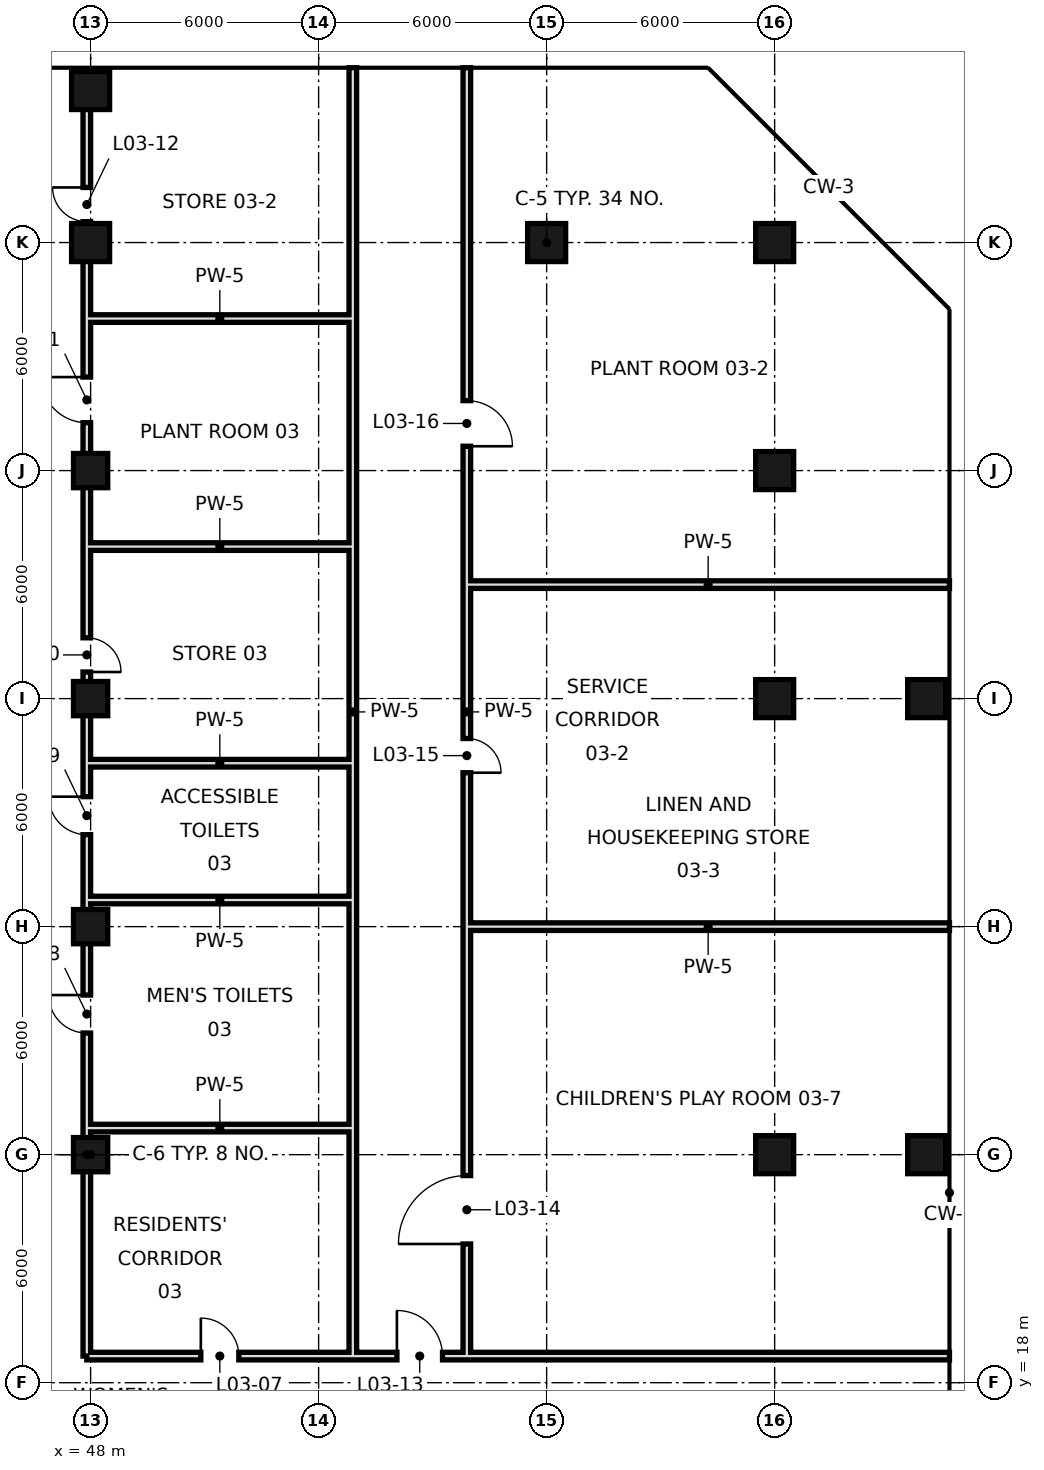
"""IFC4 building model, lengths in metres.
Left out: names, types, materials, properties, quantities, classifications, styles, units other than length and angle.
Written with IfcOpenShell. Run it as: python <this file> out.ifc"""

import sys

from ifc_helpers import new_model, si_unit, direction, frame, frame_2d, origin, origin_2d, place, context, subcontext, project, spatial, rectangle, hollow_rectangle, extrude, element, fill, save


model = new_model("IFC4")
c1 = context("Model", 3, precision=1e-05, world=origin(), true_north=direction((0.0, 1.0)))
c2 = subcontext(c1, "Body", "Model", "MODEL_VIEW")
j1 = project(units=[si_unit("LENGTHUNIT", "METRE"), si_unit("PLANEANGLEUNIT", "RADIAN")], contexts=[c1])
p1 = place(None, origin())
s1 = spatial("IfcSite", under=j1, at=p1, CompositionType="ELEMENT")
p2 = place(p1, origin())
s2 = spatial("IfcBuilding", under=s1, at=p2, CompositionType="ELEMENT")
p3 = place(p2, frame((0.0, 0.0, 25.2)))
s3 = spatial("IfcBuildingStorey", under=s2, at=p3, CompositionType="ELEMENT", Elevation=25.2)
for number, where, z_axis, x_axis in (
    (1, (48.0, 24.0, 0.0), (0.0, 0.0, 1.0), (1.0, 0.0, 0.0)),
    (2, (48.0, 30.0, 0.0), (0.0, 0.0, 1.0), (1.0, 0.0, 0.0)),
    (3, (48.0, 36.0, 0.0), (0.0, 0.0, 1.0), (1.0, 0.0, 0.0)),
    (4, (48.0, 42.0, 0.0), (0.0, 0.0, 1.0), (1.0, 0.0, 0.0)),
):
    element("IfcColumn", number, at=place(p3, frame(where, z_axis=z_axis, x_axis=x_axis)), inside=s3, PredefinedType="COLUMN", context=c2, shape_type="SweptSolid", body=[
        extrude(hollow_rectangle(XDim=0.9, YDim=0.9, WallThickness=0.045, at=origin_2d()), origin(), (0.0, 0.0, 1.0), 4.8),
    ])
for number, where, z_axis, x_axis in (
    (5, (48.0, 48.0, 0.0), (0.0, 0.0, 1.0), (1.0, 0.0, 0.0)),
    (6, (48.0, 52.0, 0.0), (0.0, 0.0, 1.0), (1.0, 0.0, 0.0)),
    (7, (60.0, 48.0, 0.0), (0.0, 0.0, 1.0), (1.0, 0.0, 0.0)),
    (8, (66.0, 24.0, 0.0), (0.0, 0.0, 1.0), (1.0, 0.0, 0.0)),
    (9, (66.0, 36.0, 0.0), (0.0, 0.0, 1.0), (1.0, 0.0, 0.0)),
    (10, (66.0, 42.0, 0.0), (0.0, 0.0, 1.0), (1.0, 0.0, 0.0)),
    (11, (66.0, 48.0, 0.0), (0.0, 0.0, 1.0), (1.0, 0.0, 0.0)),
    (12, (70.0, 24.0, 0.0), (0.0, 0.0, 1.0), (1.0, 0.0, 0.0)),
    (13, (70.0, 36.0, 0.0), (0.0, 0.0, 1.0), (1.0, 0.0, 0.0)),
):
    element("IfcColumn", number, at=place(p3, frame(where, z_axis=z_axis, x_axis=x_axis)), inside=s3, PredefinedType="COLUMN", context=c2, shape_type="SweptSolid", body=[
        extrude(hollow_rectangle(XDim=1.0, YDim=1.0, WallThickness=0.05, at=origin_2d()), origin(), (0.0, 0.0, 1.0), 4.8),
    ])
p4 = place(p3, frame((47.9, 18.7, 0.0), z_axis=(0.0, 0.0, 1.0), x_axis=(0.0, 1.0, 0.0)))
e14 = element("IfcWall", 14, at=p4, inside=s3, PredefinedType="SOLIDWALL", context=c2, shape_type="SweptSolid", body=[
    extrude(rectangle(XDim=33.3, YDim=0.2, at=frame_2d((16.65, 0.0))), origin(), (0.0, 0.0, 1.0), 3.7),
])
p5 = place(p4, frame((8.5, 0.0, 0.0)))
e15 = element("IfcOpeningElement", 15, at=p5, cuts=e14, PredefinedType="OPENING", context=c2, shape_type="SweptSolid", body=[
    extrude(rectangle(XDim=1.0, YDim=2.4, at=frame_2d((0.5, 1.2))), frame((0.0, 0.11, 0.0), z_axis=(0.0, -1.0, 0.0), x_axis=(1.0, 0.0, 0.0)), (0.0, 0.0, 1.0), 0.22),
])
p6 = place(p4, frame((13.72, 0.0, 0.0)))
e16 = element("IfcOpeningElement", 16, at=p6, cuts=e14, PredefinedType="OPENING", context=c2, shape_type="SweptSolid", body=[
    extrude(rectangle(XDim=1.0, YDim=2.4, at=frame_2d((0.5, 1.2))), frame((0.0, 0.11, 0.0), z_axis=(0.0, -1.0, 0.0), x_axis=(1.0, 0.0, 0.0)), (0.0, 0.0, 1.0), 0.22),
])
p7 = place(p4, frame((18.0, 0.0, 0.0)))
e17 = element("IfcOpeningElement", 17, at=p7, cuts=e14, PredefinedType="OPENING", context=c2, shape_type="SweptSolid", body=[
    extrude(rectangle(XDim=0.9, YDim=2.1, at=frame_2d((0.45, 1.05))), frame((0.0, 0.11, 0.0), z_axis=(0.0, -1.0, 0.0), x_axis=(1.0, 0.0, 0.0)), (0.0, 0.0, 1.0), 0.22),
])
p8 = place(p4, frame((24.56, 0.0, 0.0)))
e18 = element("IfcOpeningElement", 18, at=p8, cuts=e14, PredefinedType="OPENING", context=c2, shape_type="SweptSolid", body=[
    extrude(rectangle(XDim=1.2, YDim=2.4, at=frame_2d((0.6, 1.2))), frame((0.0, 0.11, 0.0), z_axis=(0.0, -1.0, 0.0), x_axis=(1.0, 0.0, 0.0)), (0.0, 0.0, 1.0), 0.22),
])
p9 = place(p4, frame((29.85, 0.0, 0.0)))
e19 = element("IfcOpeningElement", 19, at=p9, cuts=e14, PredefinedType="OPENING", context=c2, shape_type="SweptSolid", body=[
    extrude(rectangle(XDim=0.9, YDim=2.1, at=frame_2d((0.45, 1.05))), frame((0.0, 0.11, 0.0), z_axis=(0.0, -1.0, 0.0), x_axis=(1.0, 0.0, 0.0)), (0.0, 0.0, 1.0), 0.22),
])
p10 = place(p3, frame((54.9, 18.7, 0.0), z_axis=(0.0, 0.0, 1.0), x_axis=(0.0, 1.0, 0.0)))
e20 = element("IfcWall", 20, at=p10, inside=s3, PredefinedType="SOLIDWALL", context=c2, shape_type="SweptSolid", body=[
    extrude(rectangle(XDim=33.9, YDim=0.2, at=frame_2d((16.95, 0.0))), origin(), (0.0, 0.0, 1.0), 3.5),
])
p11 = place(p3, frame((57.9, 18.7, 0.0), z_axis=(0.0, 0.0, 1.0), x_axis=(0.0, 1.0, 0.0)))
e21 = element("IfcWall", 21, at=p11, inside=s3, PredefinedType="SOLIDWALL", context=c2, shape_type="SweptSolid", body=[
    extrude(rectangle(XDim=33.9, YDim=0.2, at=frame_2d((16.95, 0.0))), origin(), (0.0, 0.0, 1.0), 3.5),
])
p12 = place(p11, frame((2.95, 0.0, 0.0)))
e22 = element("IfcOpeningElement", 22, at=p12, cuts=e21, PredefinedType="OPENING", context=c2, shape_type="SweptSolid", body=[
    extrude(rectangle(XDim=1.8, YDim=2.4, at=frame_2d((0.9, 1.2))), frame((0.0, 0.11, 0.0), z_axis=(0.0, -1.0, 0.0), x_axis=(1.0, 0.0, 0.0)), (0.0, 0.0, 1.0), 0.22),
])
p13 = place(p11, frame((15.35, 0.0, 0.0)))
e23 = element("IfcOpeningElement", 23, at=p13, cuts=e21, PredefinedType="OPENING", context=c2, shape_type="SweptSolid", body=[
    extrude(rectangle(XDim=0.9, YDim=2.1, at=frame_2d((0.45, 1.05))), frame((0.0, 0.11, 0.0), z_axis=(0.0, -1.0, 0.0), x_axis=(1.0, 0.0, 0.0)), (0.0, 0.0, 1.0), 0.22),
])
p14 = place(p11, frame((23.94, 0.0, 0.0)))
e24 = element("IfcOpeningElement", 24, at=p14, cuts=e21, PredefinedType="OPENING", context=c2, shape_type="SweptSolid", body=[
    extrude(rectangle(XDim=1.2, YDim=2.4, at=frame_2d((0.6, 1.2))), frame((0.0, 0.11, 0.0), z_axis=(0.0, -1.0, 0.0), x_axis=(1.0, 0.0, 0.0)), (0.0, 0.0, 1.0), 0.22),
])
p15 = place(p3, frame((47.9, 18.7, 0.0), z_axis=(0.0, 0.0, 1.0), x_axis=(1.0, 0.0, 0.0)))
e25 = element("IfcWall", 25, at=p15, inside=s3, PredefinedType="SOLIDWALL", context=c2, shape_type="SweptSolid", body=[
    extrude(rectangle(XDim=22.7, YDim=0.2, at=frame_2d((11.35, 0.0))), origin(), (0.0, 0.0, 1.0), 3.7),
])
p16 = place(p15, frame((3.0, 0.0, 0.0)))
e26 = element("IfcOpeningElement", 26, at=p16, cuts=e25, PredefinedType="OPENING", context=c2, shape_type="SweptSolid", body=[
    extrude(rectangle(XDim=1.0, YDim=2.4, at=frame_2d((0.5, 1.2))), frame((0.0, 0.11, 0.0), z_axis=(0.0, -1.0, 0.0), x_axis=(1.0, 0.0, 0.0)), (0.0, 0.0, 1.0), 0.22),
])
p17 = place(p15, frame((8.16, 0.0, 0.0)))
e27 = element("IfcOpeningElement", 27, at=p17, cuts=e25, PredefinedType="OPENING", context=c2, shape_type="SweptSolid", body=[
    extrude(rectangle(XDim=1.2, YDim=2.4, at=frame_2d((0.6, 1.2))), frame((0.0, 0.11, 0.0), z_axis=(0.0, -1.0, 0.0), x_axis=(1.0, 0.0, 0.0)), (0.0, 0.0, 1.0), 0.22),
])
p18 = place(p3, frame((47.9, 24.7, 0.0), z_axis=(0.0, 0.0, 1.0), x_axis=(1.0, 0.0, 0.0)))
e28 = element("IfcWall", 28, at=p18, inside=s3, PredefinedType="SOLIDWALL", context=c2, shape_type="SweptSolid", body=[
    extrude(rectangle(XDim=7.0, YDim=0.2, at=frame_2d((3.5, 0.0))), origin(), (0.0, 0.0, 1.0), 3.95),
])
p19 = place(p3, frame((57.9, 30.0, 0.0), z_axis=(0.0, 0.0, 1.0), x_axis=(1.0, 0.0, 0.0)))
e29 = element("IfcWall", 29, at=p19, inside=s3, PredefinedType="SOLIDWALL", context=c2, shape_type="SweptSolid", body=[
    extrude(rectangle(XDim=12.7, YDim=0.2, at=frame_2d((6.35, 0.0))), origin(), (0.0, 0.0, 1.0), 3.5),
])
for number, where, z_axis, x_axis in (
    (30, (47.9, 30.7, 0.0), (0.0, 0.0, 1.0), (1.0, 0.0, 0.0)),
    (31, (47.9, 34.3, 0.0), (0.0, 0.0, 1.0), (1.0, 0.0, 0.0)),
):
    element("IfcWall", number, at=place(p3, frame(where, z_axis=z_axis, x_axis=x_axis)), inside=s3, PredefinedType="SOLIDWALL", context=c2, shape_type="SweptSolid", body=[
        extrude(rectangle(XDim=7.0, YDim=0.2, at=frame_2d((3.5, 0.0))), origin(), (0.0, 0.0, 1.0), 3.95),
    ])
p20 = place(p3, frame((57.9, 39.0, 0.0), z_axis=(0.0, 0.0, 1.0), x_axis=(1.0, 0.0, 0.0)))
e32 = element("IfcWall", 32, at=p20, inside=s3, PredefinedType="SOLIDWALL", context=c2, shape_type="SweptSolid", body=[
    extrude(rectangle(XDim=12.7, YDim=0.2, at=frame_2d((6.35, 0.0))), origin(), (0.0, 0.0, 1.0), 3.95),
])
for number, where, z_axis, x_axis in (
    (33, (47.9, 40.0, 0.0), (0.0, 0.0, 1.0), (1.0, 0.0, 0.0)),
    (34, (47.9, 46.0, 0.0), (0.0, 0.0, 1.0), (1.0, 0.0, 0.0)),
):
    element("IfcWall", number, at=place(p3, frame(where, z_axis=z_axis, x_axis=x_axis)), inside=s3, PredefinedType="SOLIDWALL", context=c2, shape_type="SweptSolid", body=[
        extrude(rectangle(XDim=7.0, YDim=0.2, at=frame_2d((3.5, 0.0))), origin(), (0.0, 0.0, 1.0), 3.95),
    ])
p21 = place(p16, origin())
e35 = element("IfcDoor", 35, at=p21, inside=s3, OperationType="SINGLE_SWING_LEFT", PredefinedType="DOOR", context=c2, shape_type="SweptSolid", body=[
    extrude(rectangle(XDim=1.0, YDim=2.4, at=frame_2d((0.5, 1.2))), frame((0.0, 0.025, 0.0), z_axis=(0.0, -1.0, 0.0), x_axis=(1.0, 0.0, 0.0)), (0.0, 0.0, 1.0), 0.05),
])
fill(e26, e35)
p22 = place(p5, frame((1.0, 0.0, 0.0), z_axis=(0.0, 0.0, 1.0), x_axis=(-1.0, 0.0, 0.0)))
e36 = element("IfcDoor", 36, at=p22, inside=s3, OperationType="SINGLE_SWING_LEFT", PredefinedType="DOOR", context=c2, shape_type="SweptSolid", body=[
    extrude(rectangle(XDim=1.0, YDim=2.4, at=frame_2d((0.5, 1.2))), frame((0.0, 0.025, 0.0), z_axis=(0.0, -1.0, 0.0), x_axis=(1.0, 0.0, 0.0)), (0.0, 0.0, 1.0), 0.05),
])
fill(e15, e36)
p23 = place(p6, frame((1.0, 0.0, 0.0), z_axis=(0.0, 0.0, 1.0), x_axis=(-1.0, 0.0, 0.0)))
e37 = element("IfcDoor", 37, at=p23, inside=s3, OperationType="SINGLE_SWING_LEFT", PredefinedType="DOOR", context=c2, shape_type="SweptSolid", body=[
    extrude(rectangle(XDim=1.0, YDim=2.4, at=frame_2d((0.5, 1.2))), frame((0.0, 0.025, 0.0), z_axis=(0.0, -1.0, 0.0), x_axis=(1.0, 0.0, 0.0)), (0.0, 0.0, 1.0), 0.05),
])
fill(e16, e37)
p24 = place(p7, frame((0.9, 0.0, 0.0), z_axis=(0.0, 0.0, 1.0), x_axis=(-1.0, 0.0, 0.0)))
e38 = element("IfcDoor", 38, at=p24, inside=s3, OperationType="SINGLE_SWING_RIGHT", PredefinedType="DOOR", context=c2, shape_type="SweptSolid", body=[
    extrude(rectangle(XDim=0.9, YDim=2.1, at=frame_2d((0.45, 1.05))), frame((0.0, 0.025, 0.0), z_axis=(0.0, -1.0, 0.0), x_axis=(1.0, 0.0, 0.0)), (0.0, 0.0, 1.0), 0.05),
])
fill(e17, e38)
p25 = place(p8, frame((1.2, 0.0, 0.0), z_axis=(0.0, 0.0, 1.0), x_axis=(-1.0, 0.0, 0.0)))
e39 = element("IfcDoor", 39, at=p25, inside=s3, OperationType="SINGLE_SWING_LEFT", PredefinedType="DOOR", context=c2, shape_type="SweptSolid", body=[
    extrude(rectangle(XDim=1.2, YDim=2.4, at=frame_2d((0.6, 1.2))), frame((0.0, 0.025, 0.0), z_axis=(0.0, -1.0, 0.0), x_axis=(1.0, 0.0, 0.0)), (0.0, 0.0, 1.0), 0.05),
])
fill(e18, e39)
p26 = place(p9, frame((0.9, 0.0, 0.0), z_axis=(0.0, 0.0, 1.0), x_axis=(-1.0, 0.0, 0.0)))
e40 = element("IfcDoor", 40, at=p26, inside=s3, OperationType="SINGLE_SWING_LEFT", PredefinedType="DOOR", context=c2, shape_type="SweptSolid", body=[
    extrude(rectangle(XDim=0.9, YDim=2.1, at=frame_2d((0.45, 1.05))), frame((0.0, 0.025, 0.0), z_axis=(0.0, -1.0, 0.0), x_axis=(1.0, 0.0, 0.0)), (0.0, 0.0, 1.0), 0.05),
])
fill(e19, e40)
p27 = place(p17, origin())
e41 = element("IfcDoor", 41, at=p27, inside=s3, OperationType="SINGLE_SWING_LEFT", PredefinedType="DOOR", context=c2, shape_type="SweptSolid", body=[
    extrude(rectangle(XDim=1.2, YDim=2.4, at=frame_2d((0.6, 1.2))), frame((0.0, 0.025, 0.0), z_axis=(0.0, -1.0, 0.0), x_axis=(1.0, 0.0, 0.0)), (0.0, 0.0, 1.0), 0.05),
])
fill(e27, e41)
p28 = place(p12, origin())
e42 = element("IfcDoor", 42, at=p28, inside=s3, OperationType="SINGLE_SWING_LEFT", PredefinedType="DOOR", context=c2, shape_type="SweptSolid", body=[
    extrude(rectangle(XDim=1.8, YDim=2.4, at=frame_2d((0.9, 1.2))), frame((0.0, 0.025, 0.0), z_axis=(0.0, -1.0, 0.0), x_axis=(1.0, 0.0, 0.0)), (0.0, 0.0, 1.0), 0.05),
])
fill(e22, e42)
p29 = place(p13, frame((0.9, 0.0, 0.0), z_axis=(0.0, 0.0, 1.0), x_axis=(-1.0, 0.0, 0.0)))
e43 = element("IfcDoor", 43, at=p29, inside=s3, OperationType="SINGLE_SWING_RIGHT", PredefinedType="DOOR", context=c2, shape_type="SweptSolid", body=[
    extrude(rectangle(XDim=0.9, YDim=2.1, at=frame_2d((0.45, 1.05))), frame((0.0, 0.025, 0.0), z_axis=(0.0, -1.0, 0.0), x_axis=(1.0, 0.0, 0.0)), (0.0, 0.0, 1.0), 0.05),
])
fill(e23, e43)
p30 = place(p14, frame((1.2, 0.0, 0.0), z_axis=(0.0, 0.0, 1.0), x_axis=(-1.0, 0.0, 0.0)))
e44 = element("IfcDoor", 44, at=p30, inside=s3, OperationType="SINGLE_SWING_RIGHT", PredefinedType="DOOR", context=c2, shape_type="SweptSolid", body=[
    extrude(rectangle(XDim=1.2, YDim=2.4, at=frame_2d((0.6, 1.2))), frame((0.0, 0.025, 0.0), z_axis=(0.0, -1.0, 0.0), x_axis=(1.0, 0.0, 0.0)), (0.0, 0.0, 1.0), 0.05),
])
fill(e24, e44)
save(model, sys.argv[1])
